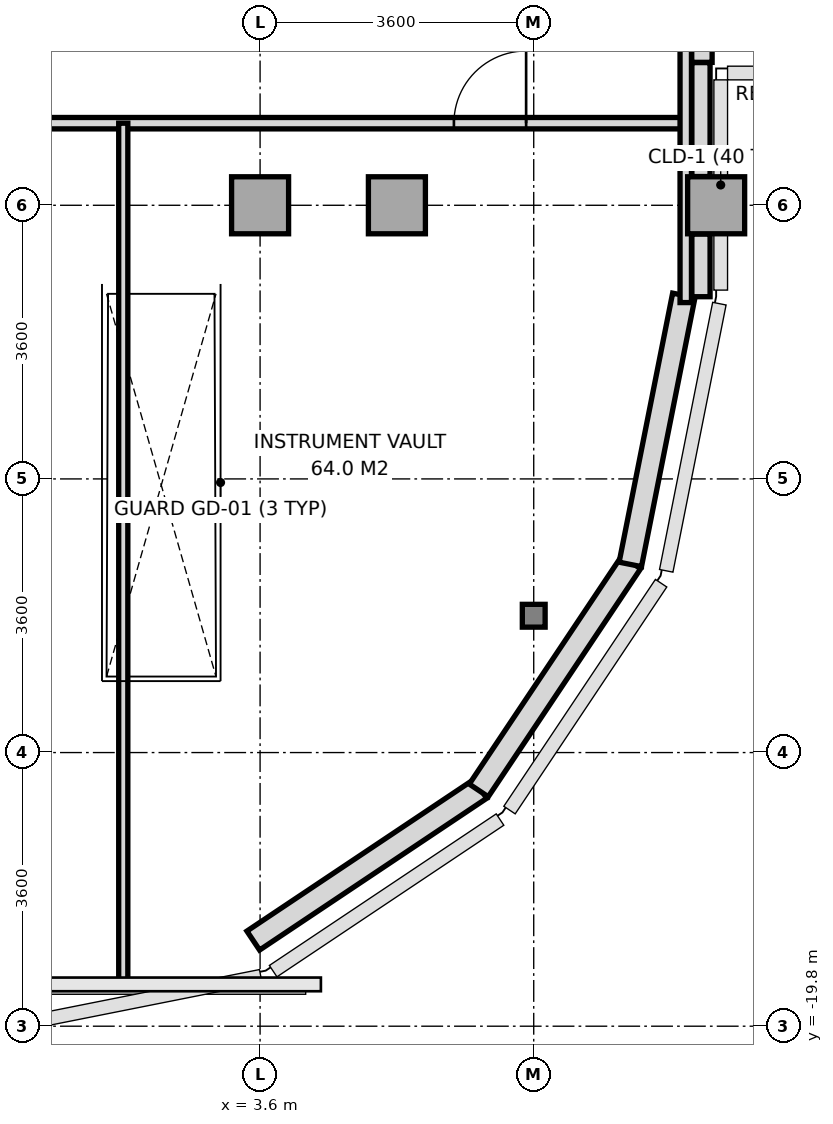
"""IFC4 building model, lengths in metres.
Left out: names, types, materials, properties, quantities, classifications, styles, units other than length and angle.
Written with IfcOpenShell. Run it as: python <this file> out.ifc"""

import sys

from ifc_helpers import new_model, si_unit, direction, frame, frame_2d, origin, origin_2d, place, context, subcontext, project, spatial, rectangle, i_section, extrude, source, transform, mapped, element, fill, save


model = new_model("IFC4")
c1 = context("Model", 3, precision=1e-05, world=origin(), true_north=direction((0.0, 1.0)))
c2 = subcontext(c1, "Body", "Model", "MODEL_VIEW")
j1 = project(units=[si_unit("LENGTHUNIT", "METRE"), si_unit("PLANEANGLEUNIT", "RADIAN")], contexts=[c1])
p1 = place(None, origin())
s1 = spatial("IfcSite", under=j1, at=p1, CompositionType="ELEMENT")
p2 = place(p1, origin())
s2 = spatial("IfcBuilding", under=s1, at=p2, CompositionType="ELEMENT")
p3 = place(p2, frame((0.0, 0.0, 255.6)))
s3 = spatial("IfcBuildingStorey", under=s2, at=p3, CompositionType="ELEMENT", Elevation=255.6)
m1 = source(origin(), c2, "Body", "SweptSolid", [
    extrude(rectangle(XDim=0.75, YDim=0.75, at=origin_2d()), origin(), (0.0, 0.0, 1.0), 3.01),
])
for number, where, z_axis, x_axis in (
    (1, (3.6, -9.0, 0.0), (0.0, 0.0, 1.0), (1.0, 0.0, 0.0)),
    (2, (5.4, -9.0, 0.0), (0.0, 0.0, 1.0), (1.0, 0.0, 0.0)),
):
    element("IfcColumn", number, at=place(p3, frame(where, z_axis=z_axis, x_axis=x_axis)), inside=s3, PredefinedType="COLUMN", context=c2, shape_type="MappedRepresentation", body=[
        mapped(m1, transform((0.0, 0.0, 0.0), x_axis=(1.0, 0.0, 0.0), y_axis=(0.0, 1.0, 0.0), z_axis=(0.0, 0.0, 1.0), scale=1.0)),
    ])
m2 = source(origin(), c2, "Body", "SweptSolid", [
    extrude(i_section(OverallWidth=0.3, OverallDepth=0.3, WebThickness=0.011, FlangeThickness=0.019, at=origin_2d()), origin(), (0.0, 0.0, 1.0), 3.01),
])
p4 = place(p3, frame((7.2, -14.4, 0.0), z_axis=(0.0, 0.0, 1.0), x_axis=(1.0, 0.0, 0.0)))
e3 = element("IfcColumn", 3, at=p4, inside=s3, PredefinedType="COLUMN", context=c2, shape_type="MappedRepresentation", body=[
    mapped(m2, transform((0.0, 0.0, 0.0), x_axis=(1.0, 0.0, 0.0), y_axis=(0.0, 1.0, 0.0), z_axis=(0.0, 0.0, 1.0), scale=1.0)),
])
p5 = place(p3, frame((9.6, -9.0, 0.0), z_axis=(0.0, 0.0, 1.0), x_axis=(1.0, 0.0, 0.0)))
e4 = element("IfcColumn", 4, at=p5, inside=s3, PredefinedType="COLUMN", context=c2, shape_type="MappedRepresentation", body=[
    mapped(m1, transform((0.0, 0.0, 0.0), x_axis=(1.0, 0.0, 0.0), y_axis=(0.0, 1.0, 0.0), z_axis=(0.0, 0.0, 1.0), scale=1.0)),
])
p6 = place(p3, frame((3.51, -18.674, 0.0), z_axis=(0.0, 0.0, 1.0), x_axis=(0.831443568068, 0.555609208993, 0.0)))
e5 = element("IfcWall", 5, at=p6, inside=s3, PredefinedType="SOLIDWALL", context=c2, shape_type="SweptSolid", body=[
    extrude(rectangle(XDim=3.594, YDim=0.3, at=frame_2d((1.797, 0.0))), origin(), (0.0, 0.0, 1.0), 3.01),
])
p7 = place(p3, frame((6.477, -16.698, 0.0), z_axis=(0.0, 0.0, 1.0), x_axis=(0.555574187116, 0.831466970246, 0.0)))
e6 = element("IfcWall", 6, at=p7, inside=s3, PredefinedType="SOLIDWALL", context=c2, shape_type="SweptSolid", body=[
    extrude(rectangle(XDim=3.609, YDim=0.3, at=frame_2d((1.804, 0.0))), origin(), (0.0, 0.0, 1.0), 2.61),
])
p8 = place(p3, frame((8.471, -13.725, 0.0), z_axis=(0.0, 0.0, 1.0), x_axis=(0.195114232679, 0.980780523974, 0.0)))
e7 = element("IfcWall", 7, at=p8, inside=s3, PredefinedType="SOLIDWALL", context=c2, shape_type="SweptSolid", body=[
    extrude(rectangle(XDim=3.609, YDim=0.3, at=frame_2d((1.804, 0.0))), origin(), (0.0, 0.0, 1.0), 3.01),
])
p9 = place(p3, frame((9.547, -7.0, 0.0), z_axis=(0.0, 0.0, 1.0), x_axis=(-1.0, 0.0, 0.0)))
e8 = element("IfcWall", 8, at=p9, inside=s3, PredefinedType="PARAPET", context=c2, shape_type="SweptSolid", body=[
    extrude(rectangle(XDim=0.269, YDim=0.24, at=frame_2d((0.135, 0.0))), origin(), (0.0, 0.0, 1.0), 1.15),
])
p10 = place(p3, frame((9.4, -7.123, 0.0), z_axis=(0.0, 0.0, 1.0), x_axis=(0.0, -1.0, 0.0)))
e9 = element("IfcWall", 9, at=p10, inside=s3, PredefinedType="PARAPET", context=c2, shape_type="SweptSolid", body=[
    extrude(rectangle(XDim=1.499, YDim=0.24, at=frame_2d((0.75, 0.0))), origin(), (0.0, 0.0, 1.0), 1.15),
])
p11 = place(p3, frame((9.4, -9.378, 0.0), z_axis=(0.0, 0.0, 1.0), x_axis=(0.0, -1.0, 0.0)))
e10 = element("IfcWall", 10, at=p11, inside=s3, PredefinedType="PARAPET", context=c2, shape_type="SweptSolid", body=[
    extrude(rectangle(XDim=0.825, YDim=0.24, at=frame_2d((0.413, 0.0))), origin(), (0.0, 0.0, 1.0), 1.15),
])
p12 = place(p3, frame((-9.2, -7.92, 0.0), z_axis=(0.0, 0.0, 1.0), x_axis=(1.0, 0.0, 0.0)))
e11 = element("IfcWall", 11, at=p12, inside=s3, PredefinedType="PARTITIONING", context=c2, shape_type="SweptSolid", body=[
    extrude(rectangle(XDim=18.4, YDim=0.15, at=frame_2d((9.2, 0.0))), origin(), (0.0, 0.0, 1.0), 2.57),
])
p13 = place(p12, frame((2.2, 0.0, 0.0)))
e12 = element("IfcOpeningElement", 12, at=p13, cuts=e11, PredefinedType="OPENING", context=c2, shape_type="SweptSolid", body=[
    extrude(rectangle(XDim=0.95, YDim=2.15, at=frame_2d((0.475, 1.075))), frame((0.0, 0.085, 0.0), z_axis=(0.0, -1.0, 0.0), x_axis=(1.0, 0.0, 0.0)), (0.0, 0.0, 1.0), 0.17),
])
p14 = place(p12, frame((7.8, 0.0, 0.0)))
e13 = element("IfcOpeningElement", 13, at=p14, cuts=e11, PredefinedType="OPENING", context=c2, shape_type="SweptSolid", body=[
    extrude(rectangle(XDim=1.1, YDim=2.2, at=frame_2d((0.55, 1.1))), frame((0.0, 0.085, 0.0), z_axis=(0.0, -1.0, 0.0), x_axis=(1.0, 0.0, 0.0)), (0.0, 0.0, 1.0), 0.17),
])
p15 = place(p12, frame((15.35, 0.0, 0.0)))
e14 = element("IfcOpeningElement", 14, at=p15, cuts=e11, PredefinedType="OPENING", context=c2, shape_type="SweptSolid", body=[
    extrude(rectangle(XDim=0.95, YDim=2.15, at=frame_2d((0.475, 1.075))), frame((0.0, 0.085, 0.0), z_axis=(0.0, -1.0, 0.0), x_axis=(1.0, 0.0, 0.0)), (0.0, 0.0, 1.0), 0.17),
])
p16 = place(p3, frame((9.2, -10.28, 0.0), z_axis=(0.0, 0.0, 1.0), x_axis=(0.0, 1.0, 0.0)))
e15 = element("IfcWall", 15, at=p16, inside=s3, PredefinedType="PARTITIONING", context=c2, shape_type="SweptSolid", body=[
    extrude(rectangle(XDim=4.34, YDim=0.15, at=frame_2d((2.17, 0.0))), origin(), (0.0, 0.0, 1.0), 2.61),
])
p17 = place(p3, frame((1.8, -19.25, 0.0), z_axis=(0.0, 0.0, 1.0), x_axis=(0.0, 1.0, 0.0)))
e16 = element("IfcWall", 16, at=p17, inside=s3, PredefinedType="PARTITIONING", context=c2, shape_type="SweptSolid", body=[
    extrude(rectangle(XDim=11.33, YDim=0.12, at=frame_2d((5.665, 0.0))), origin(), (0.0, 0.0, 1.0), 2.61),
])
m3 = source(origin(), c2, "Body", "SweptSolid", [
    extrude(rectangle(XDim=0.95, YDim=2.15, at=frame_2d((0.475, 1.075))), frame((0.0, 0.025, 0.0), z_axis=(0.0, -1.0, 0.0), x_axis=(1.0, 0.0, 0.0)), (0.0, 0.0, 1.0), 0.05),
])
p18 = place(p15, origin())
e17 = element("IfcDoor", 17, at=p18, inside=s3, OperationType="SINGLE_SWING_RIGHT", PredefinedType="DOOR", context=c2, shape_type="MappedRepresentation", body=[
    mapped(m3, transform((0.0, 0.0, 0.0), x_axis=(1.0, 0.0, 0.0), y_axis=(0.0, 1.0, 0.0), z_axis=(0.0, 0.0, 1.0), scale=1.0)),
])
fill(e14, e17)
save(model, sys.argv[1])
